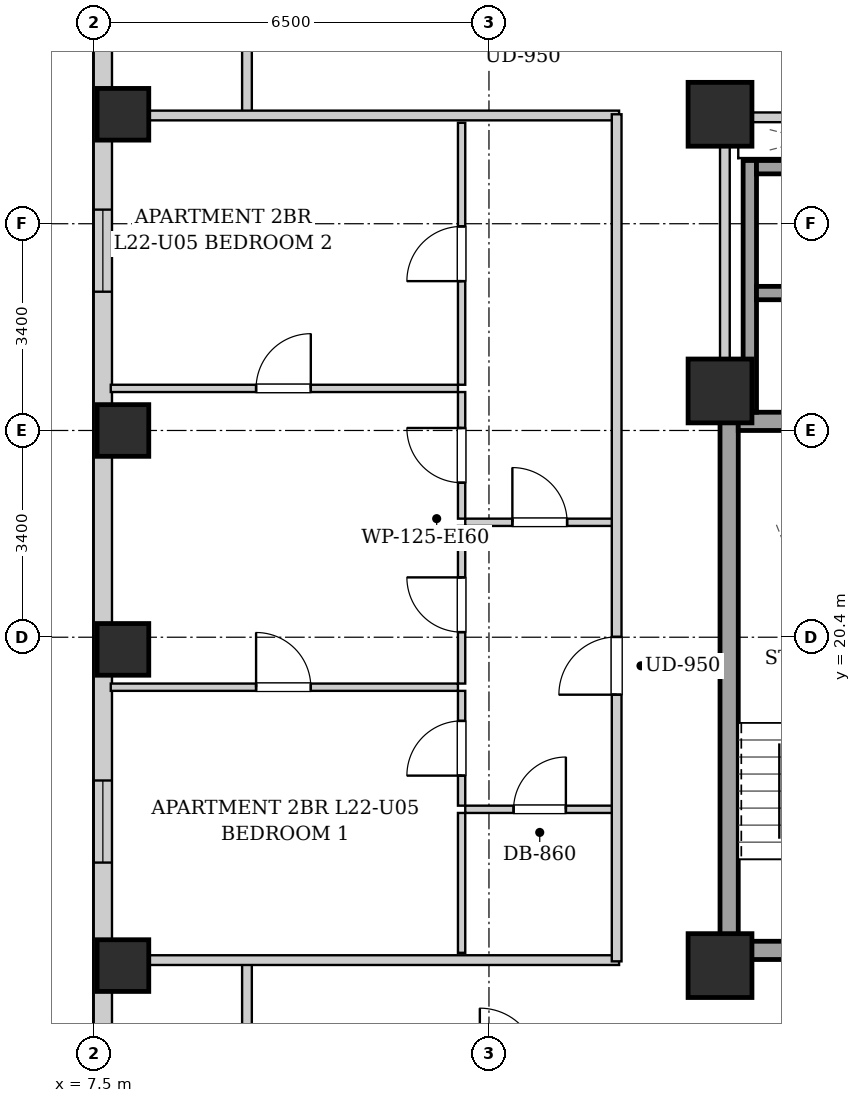
"""IFC4 building model, lengths in metres.
Left out: names, types, materials, properties, quantities, classifications, styles, units other than length and angle.
Written with IfcOpenShell. Run it as: python <this file> out.ifc"""

import sys

from ifc_helpers import new_model, si_unit, direction, frame, frame_2d, origin, origin_2d, place, context, subcontext, project, spatial, rectangle, extrude, element, fill, save


model = new_model("IFC4")
c1 = context("Model", 3, precision=1e-05, world=origin(), true_north=direction((0.0, 1.0)))
c2 = subcontext(c1, "Body", "Model", "MODEL_VIEW")
j1 = project(units=[si_unit("LENGTHUNIT", "METRE"), si_unit("PLANEANGLEUNIT", "RADIAN")], contexts=[c1])
p1 = place(None, origin())
s1 = spatial("IfcSite", under=j1, at=p1, CompositionType="ELEMENT")
p2 = place(p1, origin())
s2 = spatial("IfcBuilding", under=s1, at=p2, CompositionType="ELEMENT")
p3 = place(p2, frame((0.0, 0.0, 81.5)))
s3 = spatial("IfcBuildingStorey", under=s2, at=p3, CompositionType="ELEMENT", Elevation=81.5)
for number, where, z_axis, x_axis in (
    (1, (7.98, 15.0, 0.0), (0.0, 0.0, 1.0), (1.0, 0.0, 0.0)),
    (2, (7.98, 20.2, 0.0), (0.0, 0.0, 1.0), (1.0, 0.0, 0.0)),
    (3, (7.98, 23.8, 0.0), (0.0, 0.0, 1.0), (1.0, 0.0, 0.0)),
    (4, (7.98, 29.0, 0.0), (0.0, 0.0, 1.0), (1.0, 0.0, 0.0)),
):
    element("IfcColumn", number, at=place(p3, frame(where, z_axis=z_axis, x_axis=x_axis)), inside=s3, PredefinedType="COLUMN", context=c2, shape_type="SweptSolid", body=[
        extrude(rectangle(XDim=0.85, YDim=0.85, at=origin_2d()), origin(), (0.0, 0.0, 1.0), 3.2),
    ])
for number, where, z_axis, x_axis in (
    (5, (17.8, 15.0, 0.0), (0.0, 0.0, 1.0), (1.0, 0.0, 0.0)),
    (6, (17.8, 29.0, 0.0), (0.0, 0.0, 1.0), (1.0, 0.0, 0.0)),
    (7, (17.8, 24.45, 0.0), (0.0, 0.0, 1.0), (1.0, 0.0, 0.0)),
):
    element("IfcColumn", number, at=place(p3, frame(where, z_axis=z_axis, x_axis=x_axis)), inside=s3, PredefinedType="COLUMN", context=c2, shape_type="SweptSolid", body=[
        extrude(rectangle(XDim=1.05, YDim=1.05, at=origin_2d()), origin(), (0.0, 0.0, 1.0), 3.2),
    ])
p4 = place(p3, frame((7.65, 2.5, 0.0), z_axis=(0.0, 0.0, 1.0), x_axis=(0.0, 1.0, 0.0)))
e8 = element("IfcWall", 8, at=p4, inside=s3, PredefinedType="SOLIDWALL", context=c2, shape_type="SweptSolid", body=[
    extrude(rectangle(XDim=38.3, YDim=0.3, at=frame_2d((19.15, 0.0))), origin(), (0.0, 0.0, 1.0), 2.94),
])
p5 = place(p4, frame((3.38, 0.0, 0.55)))
e9 = element("IfcOpeningElement", 9, at=p5, cuts=e8, PredefinedType="OPENING", context=c2, shape_type="SweptSolid", body=[
    extrude(rectangle(XDim=1.35, YDim=1.2, at=frame_2d((0.675, 0.6))), frame((0.0, 0.16, 0.0), z_axis=(0.0, -1.0, 0.0), x_axis=(1.0, 0.0, 0.0)), (0.0, 0.0, 1.0), 0.32),
])
p6 = place(p4, frame((1.135, 0.0, 0.55)))
e10 = element("IfcOpeningElement", 10, at=p6, cuts=e8, PredefinedType="OPENING", context=c2, shape_type="SweptSolid", body=[
    extrude(rectangle(XDim=1.35, YDim=1.2, at=frame_2d((0.675, 0.6))), frame((0.0, 0.16, 0.0), z_axis=(0.0, -1.0, 0.0), x_axis=(1.0, 0.0, 0.0)), (0.0, 0.0, 1.0), 0.32),
])
p7 = place(p4, frame((33.946, 0.0, 0.55)))
e11 = element("IfcOpeningElement", 11, at=p7, cuts=e8, PredefinedType="OPENING", context=c2, shape_type="SweptSolid", body=[
    extrude(rectangle(XDim=1.35, YDim=1.2, at=frame_2d((0.675, 0.6))), frame((0.0, 0.16, 0.0), z_axis=(0.0, -1.0, 0.0), x_axis=(1.0, 0.0, 0.0)), (0.0, 0.0, 1.0), 0.32),
])
p8 = place(p4, frame((32.085, 0.0, 0.55)))
e12 = element("IfcOpeningElement", 12, at=p8, cuts=e8, PredefinedType="OPENING", context=c2, shape_type="SweptSolid", body=[
    extrude(rectangle(XDim=1.35, YDim=1.2, at=frame_2d((0.675, 0.6))), frame((0.0, 0.16, 0.0), z_axis=(0.0, -1.0, 0.0), x_axis=(1.0, 0.0, 0.0)), (0.0, 0.0, 1.0), 0.32),
])
p9 = place(p4, frame((14.194, 0.0, 0.55)))
e13 = element("IfcOpeningElement", 13, at=p9, cuts=e8, PredefinedType="OPENING", context=c2, shape_type="SweptSolid", body=[
    extrude(rectangle(XDim=1.35, YDim=1.2, at=frame_2d((0.675, 0.6))), frame((0.0, 0.16, 0.0), z_axis=(0.0, -1.0, 0.0), x_axis=(1.0, 0.0, 0.0)), (0.0, 0.0, 1.0), 0.32),
])
p10 = place(p4, frame((23.582, 0.0, 0.55)))
e14 = element("IfcOpeningElement", 14, at=p10, cuts=e8, PredefinedType="OPENING", context=c2, shape_type="SweptSolid", body=[
    extrude(rectangle(XDim=1.35, YDim=1.2, at=frame_2d((0.675, 0.6))), frame((0.0, 0.16, 0.0), z_axis=(0.0, -1.0, 0.0), x_axis=(1.0, 0.0, 0.0)), (0.0, 0.0, 1.0), 0.32),
])
p11 = place(p3, frame((17.95, 15.1, 0.0), z_axis=(0.0, 0.0, 1.0), x_axis=(0.0, 1.0, 0.0)))
e15 = element("IfcWall", 15, at=p11, inside=s3, PredefinedType="SHEAR", context=c2, shape_type="SweptSolid", body=[
    extrude(rectangle(XDim=9.0, YDim=0.3, at=frame_2d((4.5, 0.0))), origin(), (0.0, 0.0, 1.0), 2.94),
])
p12 = place(p3, frame((18.1, 23.95, 0.0), z_axis=(0.0, 0.0, 1.0), x_axis=(1.0, 0.0, 0.0)))
e16 = element("IfcWall", 16, at=p12, inside=s3, PredefinedType="SHEAR", context=c2, shape_type="SweptSolid", body=[
    extrude(rectangle(XDim=2.85, YDim=0.3, at=frame_2d((1.425, 0.0))), origin(), (0.0, 0.0, 1.0), 2.94),
])
p13 = place(p3, frame((18.1, 15.25, 0.0), z_axis=(0.0, 0.0, 1.0), x_axis=(1.0, 0.0, 0.0)))
e17 = element("IfcWall", 17, at=p13, inside=s3, PredefinedType="SHEAR", context=c2, shape_type="SweptSolid", body=[
    extrude(rectangle(XDim=2.85, YDim=0.3, at=frame_2d((1.425, 0.0))), origin(), (0.0, 0.0, 1.0), 2.94),
])
p14 = place(p13, frame((0.86, 0.0, 0.0)))
e18 = element("IfcOpeningElement", 18, at=p14, cuts=e17, PredefinedType="OPENING", context=c2, shape_type="SweptSolid", body=[
    extrude(rectangle(XDim=1.1, YDim=2.05, at=frame_2d((0.55, 1.025))), frame((0.0, 0.16, 0.0), z_axis=(0.0, -1.0, 0.0), x_axis=(1.0, 0.0, 0.0)), (0.0, 0.0, 1.0), 0.32),
])
p15 = place(p3, frame((18.29, 24.1, 0.0), z_axis=(0.0, 0.0, 1.0), x_axis=(0.0, 1.0, 0.0)))
e19 = element("IfcWall", 19, at=p15, inside=s3, PredefinedType="SHEAR", context=c2, shape_type="SweptSolid", body=[
    extrude(rectangle(XDim=4.14, YDim=0.22, at=frame_2d((2.07, 0.0))), origin(), (0.0, 0.0, 1.0), 2.94),
])
for number, where, z_axis, x_axis in (
    (20, (18.4, 26.06, 0.0), (0.0, 0.0, 1.0), (1.0, 0.0, 0.0)),
    (21, (18.4, 28.13, 0.0), (0.0, 0.0, 1.0), (1.0, 0.0, 0.0)),
):
    element("IfcWall", number, at=place(p3, frame(where, z_axis=z_axis, x_axis=x_axis)), inside=s3, PredefinedType="SHEAR", context=c2, shape_type="SweptSolid", body=[
        extrude(rectangle(XDim=1.9, YDim=0.22, at=frame_2d((0.95, 0.0))), origin(), (0.0, 0.0, 1.0), 2.94),
    ])
p16 = place(p3, frame((17.88, 24.12, 0.0), z_axis=(0.0, 0.0, 1.0), x_axis=(0.0, 1.0, 0.0)))
e22 = element("IfcWall", 22, at=p16, inside=s3, PredefinedType="PARTITIONING", context=c2, shape_type="SweptSolid", body=[
    extrude(rectangle(XDim=4.76, YDim=0.16, at=frame_2d((2.38, 0.0))), origin(), (0.0, 0.0, 1.0), 2.94),
])
p17 = place(p3, frame((17.96, 28.95, 0.0), z_axis=(0.0, 0.0, 1.0), x_axis=(1.0, 0.0, 0.0)))
e23 = element("IfcWall", 23, at=p17, inside=s3, PredefinedType="PARTITIONING", context=c2, shape_type="SweptSolid", body=[
    extrude(rectangle(XDim=4.29, YDim=0.16, at=frame_2d((2.145, 0.0))), origin(), (0.0, 0.0, 1.0), 2.309),
])
p18 = place(p17, frame((1.645, 0.0, 0.0)))
e24 = element("IfcOpeningElement", 24, at=p18, cuts=e23, PredefinedType="OPENING", context=c2, shape_type="SweptSolid", body=[
    extrude(rectangle(XDim=0.86, YDim=2.05, at=frame_2d((0.43, 1.025))), frame((0.0, 0.09, 0.0), z_axis=(0.0, -1.0, 0.0), x_axis=(1.0, 0.0, 0.0)), (0.0, 0.0, 1.0), 0.18),
])
for number, where, z_axis, x_axis in (
    (25, (10.02, 13.35, 0.0), (0.0, 0.0, 1.0), (0.0, 1.0, 0.0)),
    (26, (10.02, 28.98, 0.0), (0.0, 0.0, 1.0), (0.0, 1.0, 0.0)),
):
    element("IfcWall", number, at=place(p3, frame(where, z_axis=z_axis, x_axis=x_axis)), inside=s3, PredefinedType="PARTITIONING", context=c2, shape_type="SweptSolid", body=[
        extrude(rectangle(XDim=1.74, YDim=0.16, at=frame_2d((0.87, 0.0))), origin(), (0.0, 0.0, 1.0), 2.94),
    ])
for number, where, z_axis, x_axis in (
    (27, (7.78, 15.09, 0.0), (0.0, 0.0, 1.0), (1.0, 0.0, 0.0)),
    (28, (7.78, 28.98, 0.0), (0.0, 0.0, 1.0), (1.0, 0.0, 0.0)),
):
    element("IfcWall", number, at=place(p3, frame(where, z_axis=z_axis, x_axis=x_axis)), inside=s3, PredefinedType="PARTITIONING", context=c2, shape_type="SweptSolid", body=[
        extrude(rectangle(XDim=8.36, YDim=0.16, at=frame_2d((4.18, 0.0))), origin(), (0.0, 0.0, 1.0), 2.309),
    ])
p19 = place(p3, frame((13.61, 22.29, 0.0), z_axis=(0.0, 0.0, 1.0), x_axis=(1.0, 0.0, 0.0)))
e29 = element("IfcWall", 29, at=p19, inside=s3, PredefinedType="PARTITIONING", context=c2, shape_type="SweptSolid", body=[
    extrude(rectangle(XDim=2.45, YDim=0.12, at=frame_2d((1.225, 0.0))), origin(), (0.0, 0.0, 1.0), 2.94),
])
p20 = place(p19, frame((0.775, 0.0, 0.0)))
e30 = element("IfcOpeningElement", 30, at=p20, cuts=e29, PredefinedType="OPENING", context=c2, shape_type="SweptSolid", body=[
    extrude(rectangle(XDim=0.9, YDim=2.05, at=frame_2d((0.45, 1.025))), frame((0.0, 0.07, 0.0), z_axis=(0.0, -1.0, 0.0), x_axis=(1.0, 0.0, 0.0)), (0.0, 0.0, 1.0), 0.14),
])
p21 = place(p3, frame((13.55, 22.35, 0.0), z_axis=(0.0, 0.0, 1.0), x_axis=(0.0, 1.0, 0.0)))
e31 = element("IfcWall", 31, at=p21, inside=s3, PredefinedType="PARTITIONING", context=c2, shape_type="SweptSolid", body=[
    extrude(rectangle(XDim=2.082, YDim=0.12, at=frame_2d((1.041, 0.0))), origin(), (0.0, 0.0, 1.0), 2.94),
])
p22 = place(p21, frame((0.591, 0.0, 0.0)))
e32 = element("IfcOpeningElement", 32, at=p22, cuts=e31, PredefinedType="OPENING", context=c2, shape_type="SweptSolid", body=[
    extrude(rectangle(XDim=0.9, YDim=2.05, at=frame_2d((0.45, 1.025))), frame((0.0, 0.07, 0.0), z_axis=(0.0, -1.0, 0.0), x_axis=(1.0, 0.0, 0.0)), (0.0, 0.0, 1.0), 0.14),
])
p23 = place(p3, frame((13.55, 24.552, 0.0), z_axis=(0.0, 0.0, 1.0), x_axis=(0.0, 1.0, 0.0)))
e33 = element("IfcWall", 33, at=p23, inside=s3, PredefinedType="PARTITIONING", context=c2, shape_type="SweptSolid", body=[
    extrude(rectangle(XDim=4.308, YDim=0.12, at=frame_2d((2.154, 0.0))), origin(), (0.0, 0.0, 1.0), 2.94),
])
p24 = place(p23, frame((1.704, 0.0, 0.0)))
e34 = element("IfcOpeningElement", 34, at=p24, cuts=e33, PredefinedType="OPENING", context=c2, shape_type="SweptSolid", body=[
    extrude(rectangle(XDim=0.9, YDim=2.05, at=frame_2d((0.45, 1.025))), frame((0.0, 0.07, 0.0), z_axis=(0.0, -1.0, 0.0), x_axis=(1.0, 0.0, 0.0)), (0.0, 0.0, 1.0), 0.14),
])
p25 = place(p3, frame((13.61, 17.57, 0.0), z_axis=(0.0, 0.0, 1.0), x_axis=(1.0, 0.0, 0.0)))
e35 = element("IfcWall", 35, at=p25, inside=s3, PredefinedType="PARTITIONING", context=c2, shape_type="SweptSolid", body=[
    extrude(rectangle(XDim=2.45, YDim=0.12, at=frame_2d((1.225, 0.0))), origin(), (0.0, 0.0, 1.0), 2.94),
])
p26 = place(p25, frame((0.795, 0.0, 0.0)))
e36 = element("IfcOpeningElement", 36, at=p26, cuts=e35, PredefinedType="OPENING", context=c2, shape_type="SweptSolid", body=[
    extrude(rectangle(XDim=0.86, YDim=2.05, at=frame_2d((0.43, 1.025))), frame((0.0, 0.07, 0.0), z_axis=(0.0, -1.0, 0.0), x_axis=(1.0, 0.0, 0.0)), (0.0, 0.0, 1.0), 0.14),
])
p27 = place(p3, frame((13.55, 15.21, 0.0), z_axis=(0.0, 0.0, 1.0), x_axis=(0.0, 1.0, 0.0)))
e37 = element("IfcWall", 37, at=p27, inside=s3, PredefinedType="PARTITIONING", context=c2, shape_type="SweptSolid", body=[
    extrude(rectangle(XDim=2.3, YDim=0.12, at=frame_2d((1.15, 0.0))), origin(), (0.0, 0.0, 1.0), 2.94),
])
p28 = place(p3, frame((13.55, 17.63, 0.0), z_axis=(0.0, 0.0, 1.0), x_axis=(0.0, 1.0, 0.0)))
e38 = element("IfcWall", 38, at=p28, inside=s3, PredefinedType="PARTITIONING", context=c2, shape_type="SweptSolid", body=[
    extrude(rectangle(XDim=1.888, YDim=0.12, at=frame_2d((0.944, 0.0))), origin(), (0.0, 0.0, 1.0), 2.94),
])
p29 = place(p28, frame((0.494, 0.0, 0.0)))
e39 = element("IfcOpeningElement", 39, at=p29, cuts=e38, PredefinedType="OPENING", context=c2, shape_type="SweptSolid", body=[
    extrude(rectangle(XDim=0.9, YDim=2.05, at=frame_2d((0.45, 1.025))), frame((0.0, 0.07, 0.0), z_axis=(0.0, -1.0, 0.0), x_axis=(1.0, 0.0, 0.0)), (0.0, 0.0, 1.0), 0.14),
])
p30 = place(p3, frame((13.55, 19.638, 0.0), z_axis=(0.0, 0.0, 1.0), x_axis=(0.0, 1.0, 0.0)))
e40 = element("IfcWall", 40, at=p30, inside=s3, PredefinedType="PARTITIONING", context=c2, shape_type="SweptSolid", body=[
    extrude(rectangle(XDim=2.592, YDim=0.12, at=frame_2d((1.296, 0.0))), origin(), (0.0, 0.0, 1.0), 2.94),
])
p31 = place(p30, frame((0.846, 0.0, 0.0)))
e41 = element("IfcOpeningElement", 41, at=p31, cuts=e40, PredefinedType="OPENING", context=c2, shape_type="SweptSolid", body=[
    extrude(rectangle(XDim=0.9, YDim=2.05, at=frame_2d((0.45, 1.025))), frame((0.0, 0.07, 0.0), z_axis=(0.0, -1.0, 0.0), x_axis=(1.0, 0.0, 0.0)), (0.0, 0.0, 1.0), 0.14),
])
p32 = place(p3, frame((7.78, 19.578, 0.0), z_axis=(0.0, 0.0, 1.0), x_axis=(1.0, 0.0, 0.0)))
e42 = element("IfcWall", 42, at=p32, inside=s3, PredefinedType="PARTITIONING", context=c2, shape_type="SweptSolid", body=[
    extrude(rectangle(XDim=5.71, YDim=0.12, at=frame_2d((2.855, 0.0))), origin(), (0.0, 0.0, 1.0), 2.94),
])
p33 = place(p32, frame((2.39, 0.0, 0.0)))
e43 = element("IfcOpeningElement", 43, at=p33, cuts=e42, PredefinedType="OPENING", context=c2, shape_type="SweptSolid", body=[
    extrude(rectangle(XDim=0.9, YDim=2.05, at=frame_2d((0.45, 1.025))), frame((0.0, 0.07, 0.0), z_axis=(0.0, -1.0, 0.0), x_axis=(1.0, 0.0, 0.0)), (0.0, 0.0, 1.0), 0.14),
])
p34 = place(p3, frame((7.78, 24.492, 0.0), z_axis=(0.0, 0.0, 1.0), x_axis=(1.0, 0.0, 0.0)))
e44 = element("IfcWall", 44, at=p34, inside=s3, PredefinedType="PARTITIONING", context=c2, shape_type="SweptSolid", body=[
    extrude(rectangle(XDim=5.71, YDim=0.12, at=frame_2d((2.855, 0.0))), origin(), (0.0, 0.0, 1.0), 2.518),
])
p35 = place(p34, frame((2.39, 0.0, 0.0)))
e45 = element("IfcOpeningElement", 45, at=p35, cuts=e44, PredefinedType="OPENING", context=c2, shape_type="SweptSolid", body=[
    extrude(rectangle(XDim=0.9, YDim=2.05, at=frame_2d((0.45, 1.025))), frame((0.0, 0.07, 0.0), z_axis=(0.0, -1.0, 0.0), x_axis=(1.0, 0.0, 0.0)), (0.0, 0.0, 1.0), 0.14),
])
p36 = place(p3, frame((16.1, 15.07, 0.0), z_axis=(0.0, 0.0, 1.0), x_axis=(0.0, 1.0, 0.0)))
e46 = element("IfcWall", 46, at=p36, inside=s3, PredefinedType="PARTITIONING", context=c2, shape_type="SweptSolid", body=[
    extrude(rectangle(XDim=13.93, YDim=0.16, at=frame_2d((6.965, 0.0))), origin(), (0.0, 0.0, 1.0), 2.94),
])
p37 = place(p36, frame((4.385, 0.0, 0.0)))
e47 = element("IfcOpeningElement", 47, at=p37, cuts=e46, PredefinedType="OPENING", context=c2, shape_type="SweptSolid", body=[
    extrude(rectangle(XDim=0.95, YDim=2.1, at=frame_2d((0.475, 1.05))), frame((0.0, 0.09, 0.0), z_axis=(0.0, -1.0, 0.0), x_axis=(1.0, 0.0, 0.0)), (0.0, 0.0, 1.0), 0.18),
])
p38 = place(p20, origin())
e48 = element("IfcDoor", 48, at=p38, inside=s3, OperationType="SINGLE_SWING_LEFT", PredefinedType="DOOR", context=c2, shape_type="SweptSolid", body=[
    extrude(rectangle(XDim=0.9, YDim=2.05, at=frame_2d((0.45, 1.025))), frame((0.0, 0.025, 0.0), z_axis=(0.0, -1.0, 0.0), x_axis=(1.0, 0.0, 0.0)), (0.0, 0.0, 1.0), 0.05),
])
fill(e30, e48)
p39 = place(p22, origin())
e49 = element("IfcDoor", 49, at=p39, inside=s3, OperationType="SINGLE_SWING_RIGHT", PredefinedType="DOOR", context=c2, shape_type="SweptSolid", body=[
    extrude(rectangle(XDim=0.9, YDim=2.05, at=frame_2d((0.45, 1.025))), frame((0.0, 0.025, 0.0), z_axis=(0.0, -1.0, 0.0), x_axis=(1.0, 0.0, 0.0)), (0.0, 0.0, 1.0), 0.05),
])
fill(e32, e49)
p40 = place(p24, origin())
e50 = element("IfcDoor", 50, at=p40, inside=s3, OperationType="SINGLE_SWING_LEFT", PredefinedType="DOOR", context=c2, shape_type="SweptSolid", body=[
    extrude(rectangle(XDim=0.9, YDim=2.05, at=frame_2d((0.45, 1.025))), frame((0.0, 0.025, 0.0), z_axis=(0.0, -1.0, 0.0), x_axis=(1.0, 0.0, 0.0)), (0.0, 0.0, 1.0), 0.05),
])
fill(e34, e50)
p41 = place(p26, origin())
e51 = element("IfcDoor", 51, at=p41, inside=s3, OperationType="SINGLE_SWING_RIGHT", PredefinedType="DOOR", context=c2, shape_type="SweptSolid", body=[
    extrude(rectangle(XDim=0.86, YDim=2.05, at=frame_2d((0.43, 1.025))), frame((0.0, 0.025, 0.0), z_axis=(0.0, -1.0, 0.0), x_axis=(1.0, 0.0, 0.0)), (0.0, 0.0, 1.0), 0.05),
])
fill(e36, e51)
p42 = place(p29, origin())
e52 = element("IfcDoor", 52, at=p42, inside=s3, OperationType="SINGLE_SWING_LEFT", PredefinedType="DOOR", context=c2, shape_type="SweptSolid", body=[
    extrude(rectangle(XDim=0.9, YDim=2.05, at=frame_2d((0.45, 1.025))), frame((0.0, 0.025, 0.0), z_axis=(0.0, -1.0, 0.0), x_axis=(1.0, 0.0, 0.0)), (0.0, 0.0, 1.0), 0.05),
])
fill(e39, e52)
p43 = place(p31, origin())
e53 = element("IfcDoor", 53, at=p43, inside=s3, OperationType="SINGLE_SWING_RIGHT", PredefinedType="DOOR", context=c2, shape_type="SweptSolid", body=[
    extrude(rectangle(XDim=0.9, YDim=2.05, at=frame_2d((0.45, 1.025))), frame((0.0, 0.025, 0.0), z_axis=(0.0, -1.0, 0.0), x_axis=(1.0, 0.0, 0.0)), (0.0, 0.0, 1.0), 0.05),
])
fill(e41, e53)
p44 = place(p33, origin())
e54 = element("IfcDoor", 54, at=p44, inside=s3, OperationType="SINGLE_SWING_LEFT", PredefinedType="DOOR", context=c2, shape_type="SweptSolid", body=[
    extrude(rectangle(XDim=0.9, YDim=2.05, at=frame_2d((0.45, 1.025))), frame((0.0, 0.025, 0.0), z_axis=(0.0, -1.0, 0.0), x_axis=(1.0, 0.0, 0.0)), (0.0, 0.0, 1.0), 0.05),
])
fill(e43, e54)
p45 = place(p35, origin())
e55 = element("IfcDoor", 55, at=p45, inside=s3, OperationType="SINGLE_SWING_RIGHT", PredefinedType="DOOR", context=c2, shape_type="SweptSolid", body=[
    extrude(rectangle(XDim=0.9, YDim=2.05, at=frame_2d((0.45, 1.025))), frame((0.0, 0.025, 0.0), z_axis=(0.0, -1.0, 0.0), x_axis=(1.0, 0.0, 0.0)), (0.0, 0.0, 1.0), 0.05),
])
fill(e45, e55)
p46 = place(p37, origin())
e56 = element("IfcDoor", 56, at=p46, inside=s3, OperationType="SINGLE_SWING_LEFT", PredefinedType="DOOR", context=c2, shape_type="SweptSolid", body=[
    extrude(rectangle(XDim=0.95, YDim=2.1, at=frame_2d((0.475, 1.05))), frame((0.0, 0.025, 0.0), z_axis=(0.0, -1.0, 0.0), x_axis=(1.0, 0.0, 0.0)), (0.0, 0.0, 1.0), 0.05),
])
fill(e47, e56)
p47 = place(p9, origin())
e57 = element("IfcWindow", 57, at=p47, inside=s3, PartitioningType="SINGLE_PANEL", PredefinedType="WINDOW", context=c2, shape_type="SweptSolid", body=[
    extrude(rectangle(XDim=1.35, YDim=1.2, at=frame_2d((0.675, 0.6))), frame((0.0, 0.03, 0.0), z_axis=(0.0, -1.0, 0.0), x_axis=(1.0, 0.0, 0.0)), (0.0, 0.0, 1.0), 0.06),
])
fill(e13, e57)
p48 = place(p10, origin())
e58 = element("IfcWindow", 58, at=p48, inside=s3, PartitioningType="SINGLE_PANEL", PredefinedType="WINDOW", context=c2, shape_type="SweptSolid", body=[
    extrude(rectangle(XDim=1.35, YDim=1.2, at=frame_2d((0.675, 0.6))), frame((0.0, 0.03, 0.0), z_axis=(0.0, -1.0, 0.0), x_axis=(1.0, 0.0, 0.0)), (0.0, 0.0, 1.0), 0.06),
])
fill(e14, e58)
save(model, sys.argv[1])
